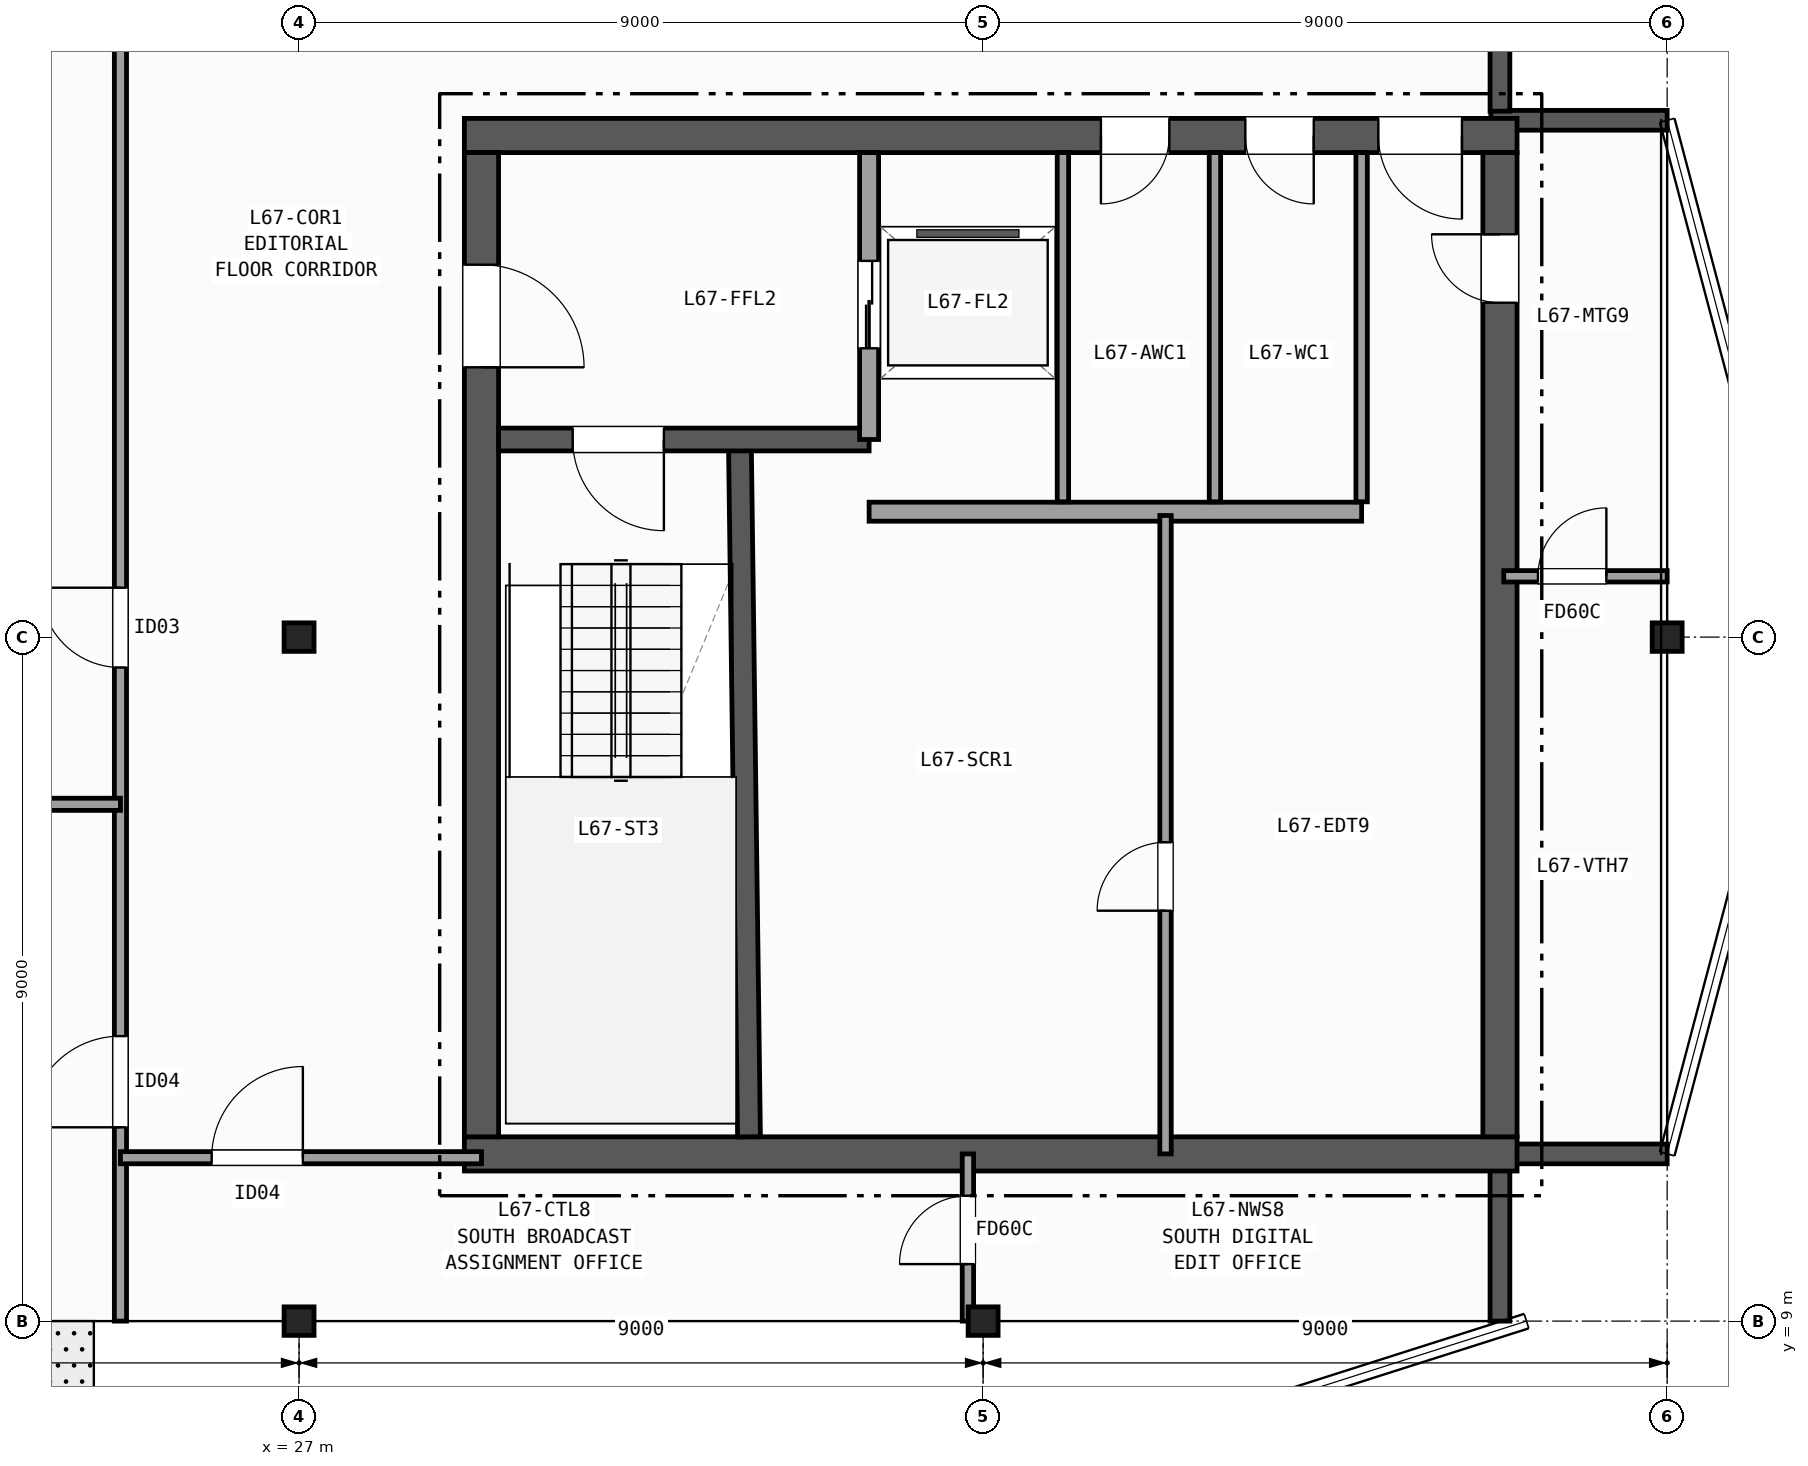
"""IFC4 building model, lengths in metres.
Left out: names, types, materials, properties, quantities, classifications, styles, units other than length and angle.
Written with IfcOpenShell. Run it as: python <this file> out.ifc"""

import sys

from ifc_helpers import new_model, si_unit, direction, frame, frame_2d, origin, origin_2d, place, context, subcontext, project, spatial, rectangle, i_section, extrude, element, fill, save


model = new_model("IFC4")
c1 = context("Model", 3, precision=1e-05, world=origin(), true_north=direction((0.0, 1.0)))
c2 = subcontext(c1, "Body", "Model", "MODEL_VIEW")
j1 = project(units=[si_unit("LENGTHUNIT", "METRE"), si_unit("PLANEANGLEUNIT", "RADIAN")], contexts=[c1])
p1 = place(None, origin())
s1 = spatial("IfcSite", under=j1, at=p1, CompositionType="ELEMENT")
p2 = place(p1, origin())
s2 = spatial("IfcBuilding", under=s1, at=p2, CompositionType="ELEMENT")
p3 = place(p2, frame((0.0, 0.0, 266.7)))
s3 = spatial("IfcBuildingStorey", under=s2, at=p3, CompositionType="ELEMENT", Elevation=266.7)
for number, where, z_axis, x_axis in (
    (1, (27.0, 9.0, 0.0), (0.0, 0.0, 1.0), (1.0, 0.0, 0.0)),
    (2, (27.0, 18.0, 0.0), (0.0, 0.0, 1.0), (1.0, 0.0, 0.0)),
    (3, (36.0, 9.0, 0.0), (0.0, 0.0, 1.0), (1.0, 0.0, 0.0)),
    (4, (45.0, 18.0, 0.0), (0.0, 0.0, 1.0), (1.0, 0.0, 0.0)),
):
    element("IfcColumn", number, at=place(p3, frame(where, z_axis=z_axis, x_axis=x_axis)), inside=s3, PredefinedType="COLUMN", context=c2, shape_type="SweptSolid", body=[
        extrude(i_section(OverallWidth=0.394, OverallDepth=0.375, WebThickness=0.017, FlangeThickness=0.028, FilletRadius=0.015, at=origin_2d()), origin(), (0.0, 0.0, 1.0), 3.7),
    ])
p4 = place(p3, frame((42.8, 9.0, 0.0), z_axis=(0.0, 0.0, 1.0), x_axis=(0.0, 1.0, 0.0)))
e5 = element("IfcWall", 5, at=p4, inside=s3, PredefinedType="SOLIDWALL", context=c2, shape_type="SweptSolid", body=[
    extrude(rectangle(XDim=2.08, YDim=0.26, at=frame_2d((1.04, 0.0))), origin(), (0.0, 0.0, 1.0), 3.42),
])
for number, where, z_axis, x_axis in (
    (6, (42.68, 11.2, 0.0), (0.0, 0.0, 1.0), (1.0, 0.0, 0.0)),
    (7, (45.0, 24.8, 0.0), (0.0, 0.0, 1.0), (-1.0, 0.0, 0.0)),
):
    element("IfcWall", number, at=place(p3, frame(where, z_axis=z_axis, x_axis=x_axis)), inside=s3, PredefinedType="SOLIDWALL", context=c2, shape_type="SweptSolid", body=[
        extrude(rectangle(XDim=2.32, YDim=0.26, at=frame_2d((1.16, 0.0))), origin(), (0.0, 0.0, 1.0), 3.42),
    ])
p5 = place(p3, frame((42.8, 24.92, 0.0), z_axis=(0.0, 0.0, 1.0), x_axis=(0.0, 1.0, 0.0)))
e8 = element("IfcWall", 8, at=p5, inside=s3, PredefinedType="SOLIDWALL", context=c2, shape_type="SweptSolid", body=[
    extrude(rectangle(XDim=2.08, YDim=0.26, at=frame_2d((1.04, 0.0))), origin(), (0.0, 0.0, 1.0), 3.42),
])
p6 = place(p3, frame((29.175, 11.2, 0.0), z_axis=(0.0, 0.0, 1.0), x_axis=(1.0, 0.0, 0.0)))
e9 = element("IfcWall", 9, at=p6, inside=s3, PredefinedType="SHEAR", context=c2, shape_type="SweptSolid", body=[
    extrude(rectangle(XDim=13.85, YDim=0.45, at=frame_2d((6.925, 0.0))), origin(), (0.0, 0.0, 1.0), 3.42),
])
p7 = place(p3, frame((43.025, 24.6, 0.0), z_axis=(0.0, 0.0, 1.0), x_axis=(-1.0, 0.0, 0.0)))
e10 = element("IfcWall", 10, at=p7, inside=s3, PredefinedType="SHEAR", context=c2, shape_type="SweptSolid", body=[
    extrude(rectangle(XDim=13.85, YDim=0.45, at=frame_2d((6.925, 0.0))), origin(), (0.0, 0.0, 1.0), 3.42),
])
p8 = place(p7, frame((0.725, 0.0, 0.0)))
e11 = element("IfcOpeningElement", 11, at=p8, cuts=e10, PredefinedType="OPENING", context=c2, shape_type="SweptSolid", body=[
    extrude(rectangle(XDim=1.1, YDim=2.15, at=frame_2d((0.55, 1.075))), frame((0.0, 0.235, 0.0), z_axis=(0.0, -1.0, 0.0), x_axis=(1.0, 0.0, 0.0)), (0.0, 0.0, 1.0), 0.47),
])
p9 = place(p7, frame((2.675, 0.0, 0.0)))
e12 = element("IfcOpeningElement", 12, at=p9, cuts=e10, PredefinedType="OPENING", context=c2, shape_type="SweptSolid", body=[
    extrude(rectangle(XDim=0.9, YDim=2.1, at=frame_2d((0.45, 1.05))), frame((0.0, 0.235, 0.0), z_axis=(0.0, -1.0, 0.0), x_axis=(1.0, 0.0, 0.0)), (0.0, 0.0, 1.0), 0.47),
])
p10 = place(p7, frame((4.575, 0.0, 0.0)))
e13 = element("IfcOpeningElement", 13, at=p10, cuts=e10, PredefinedType="OPENING", context=c2, shape_type="SweptSolid", body=[
    extrude(rectangle(XDim=0.9, YDim=2.1, at=frame_2d((0.45, 1.05))), frame((0.0, 0.235, 0.0), z_axis=(0.0, -1.0, 0.0), x_axis=(1.0, 0.0, 0.0)), (0.0, 0.0, 1.0), 0.47),
])
p11 = place(p3, frame((29.4, 24.375, 0.0), z_axis=(0.0, 0.0, 1.0), x_axis=(0.0, -1.0, 0.0)))
e14 = element("IfcWall", 14, at=p11, inside=s3, PredefinedType="SHEAR", context=c2, shape_type="SweptSolid", body=[
    extrude(rectangle(XDim=12.95, YDim=0.45, at=frame_2d((6.475, 0.0))), origin(), (0.0, 0.0, 1.0), 3.42),
])
p12 = place(p11, frame((1.475, 0.0, 0.0)))
e15 = element("IfcOpeningElement", 15, at=p12, cuts=e14, PredefinedType="OPENING", context=c2, shape_type="SweptSolid", body=[
    extrude(rectangle(XDim=1.35, YDim=2.15, at=frame_2d((0.675, 1.075))), frame((0.0, 0.235, 0.0), z_axis=(0.0, -1.0, 0.0), x_axis=(1.0, 0.0, 0.0)), (0.0, 0.0, 1.0), 0.47),
])
p13 = place(p3, frame((42.8, 11.425, 0.0), z_axis=(0.0, 0.0, 1.0), x_axis=(0.0, 1.0, 0.0)))
e16 = element("IfcWall", 16, at=p13, inside=s3, PredefinedType="SHEAR", context=c2, shape_type="SweptSolid", body=[
    extrude(rectangle(XDim=12.95, YDim=0.45, at=frame_2d((6.475, 0.0))), origin(), (0.0, 0.0, 1.0), 3.42),
])
p14 = place(p13, frame((10.975, 0.0, 0.0)))
e17 = element("IfcOpeningElement", 17, at=p14, cuts=e16, PredefinedType="OPENING", context=c2, shape_type="SweptSolid", body=[
    extrude(rectangle(XDim=0.9, YDim=2.1, at=frame_2d((0.45, 1.05))), frame((0.0, 0.235, 0.0), z_axis=(0.0, -1.0, 0.0), x_axis=(1.0, 0.0, 0.0)), (0.0, 0.0, 1.0), 0.47),
])
p15 = place(p3, frame((32.92, 11.425, 0.0), z_axis=(0.0, 0.0, 1.0), x_axis=(-0.013135638869, 0.999913723774, 0.0)))
e18 = element("IfcWall", 18, at=p15, inside=s3, PredefinedType="SHEAR", context=c2, shape_type="SweptSolid", body=[
    extrude(rectangle(XDim=9.126, YDim=0.3, at=frame_2d((4.563, 0.0))), origin(), (0.0, 0.0, 1.0), 3.42),
])
p16 = place(p3, frame((34.5, 20.6, 0.0), z_axis=(0.0, 0.0, 1.0), x_axis=(-1.0, 0.0, 0.0)))
e19 = element("IfcWall", 19, at=p16, inside=s3, PredefinedType="SHEAR", context=c2, shape_type="SweptSolid", body=[
    extrude(rectangle(XDim=4.875, YDim=0.3, at=frame_2d((2.438, 0.0))), origin(), (0.0, 0.0, 1.0), 3.42),
])
p17 = place(p16, frame((2.7, 0.0, 0.0)))
e20 = element("IfcOpeningElement", 20, at=p17, cuts=e19, PredefinedType="OPENING", context=c2, shape_type="SweptSolid", body=[
    extrude(rectangle(XDim=1.2, YDim=2.15, at=frame_2d((0.6, 1.075))), frame((0.0, 0.16, 0.0), z_axis=(0.0, -1.0, 0.0), x_axis=(1.0, 0.0, 0.0)), (0.0, 0.0, 1.0), 0.32),
])
p18 = place(p3, frame((34.5, 20.6, 0.0), z_axis=(0.0, 0.0, 1.0), x_axis=(0.0, 1.0, 0.0)))
e21 = element("IfcWall", 21, at=p18, inside=s3, PredefinedType="PARTITIONING", context=c2, shape_type="SweptSolid", body=[
    extrude(rectangle(XDim=3.775, YDim=0.25, at=frame_2d((1.887, 0.0))), origin(), (0.0, 0.0, 1.0), 3.42),
])
p19 = place(p18, frame((1.2, 0.0, 0.0)))
e22 = element("IfcOpeningElement", 22, at=p19, cuts=e21, PredefinedType="OPENING", context=c2, shape_type="SweptSolid", body=[
    extrude(rectangle(XDim=1.15, YDim=2.15, at=frame_2d((0.575, 1.075))), frame((0.0, 0.135, 0.0), z_axis=(0.0, -1.0, 0.0), x_axis=(1.0, 0.0, 0.0)), (0.0, 0.0, 1.0), 0.27),
])
p20 = place(p3, frame((34.5, 19.65, 0.0), z_axis=(0.0, 0.0, 1.0), x_axis=(1.0, 0.0, 0.0)))
e23 = element("IfcWall", 23, at=p20, inside=s3, PredefinedType="PARTITIONING", context=c2, shape_type="SweptSolid", body=[
    extrude(rectangle(XDim=6.48, YDim=0.25, at=frame_2d((3.24, 0.0))), origin(), (0.0, 0.0, 1.0), 3.42),
])
p21 = place(p3, frame((38.4, 11.2, 0.0), z_axis=(0.0, 0.0, 1.0), x_axis=(0.0, 1.0, 0.0)))
e24 = element("IfcWall", 24, at=p21, inside=s3, PredefinedType="PARTITIONING", context=c2, shape_type="SweptSolid", body=[
    extrude(rectangle(XDim=8.4, YDim=0.15, at=frame_2d((4.2, 0.0))), origin(), (0.0, 0.0, 1.0), 3.42),
])
p22 = place(p21, frame((3.2, 0.0, 0.0)))
e25 = element("IfcOpeningElement", 25, at=p22, cuts=e24, PredefinedType="OPENING", context=c2, shape_type="SweptSolid", body=[
    extrude(rectangle(XDim=0.9, YDim=2.1, at=frame_2d((0.45, 1.05))), frame((0.0, 0.085, 0.0), z_axis=(0.0, -1.0, 0.0), x_axis=(1.0, 0.0, 0.0)), (0.0, 0.0, 1.0), 0.17),
])
for number, where, z_axis, x_axis in (
    (26, (37.05, 19.78, 0.0), (0.0, 0.0, 1.0), (0.0, 1.0, 0.0)),
    (27, (39.05, 19.78, 0.0), (0.0, 0.0, 1.0), (0.0, 1.0, 0.0)),
    (28, (40.98, 19.78, 0.0), (0.0, 0.0, 1.0), (0.0, 1.0, 0.0)),
):
    element("IfcWall", number, at=place(p3, frame(where, z_axis=z_axis, x_axis=x_axis)), inside=s3, PredefinedType="PARTITIONING", context=c2, shape_type="SweptSolid", body=[
        extrude(rectangle(XDim=4.595, YDim=0.15, at=frame_2d((2.297, 0.0))), origin(), (0.0, 0.0, 1.0), 3.42),
    ])
p23 = place(p3, frame((24.65, 9.0, 0.0), z_axis=(0.0, 0.0, 1.0), x_axis=(0.0, 1.0, 0.0)))
e29 = element("IfcWall", 29, at=p23, inside=s3, PredefinedType="PARTITIONING", context=c2, shape_type="SweptSolid", body=[
    extrude(rectangle(XDim=19.2, YDim=0.16, at=frame_2d((9.6, 0.0))), origin(), (0.0, 0.0, 1.0), 2.707),
])
p24 = place(p23, frame((8.6, 0.0, 0.0)))
e30 = element("IfcOpeningElement", 30, at=p24, cuts=e29, PredefinedType="OPENING", context=c2, shape_type="SweptSolid", body=[
    extrude(rectangle(XDim=1.05, YDim=2.15, at=frame_2d((0.525, 1.075))), frame((0.0, 0.09, 0.0), z_axis=(0.0, -1.0, 0.0), x_axis=(1.0, 0.0, 0.0)), (0.0, 0.0, 1.0), 0.18),
])
p25 = place(p23, frame((2.55, 0.0, 0.0)))
e31 = element("IfcOpeningElement", 31, at=p25, cuts=e29, PredefinedType="OPENING", context=c2, shape_type="SweptSolid", body=[
    extrude(rectangle(XDim=1.2, YDim=2.15, at=frame_2d((0.6, 1.075))), frame((0.0, 0.09, 0.0), z_axis=(0.0, -1.0, 0.0), x_axis=(1.0, 0.0, 0.0)), (0.0, 0.0, 1.0), 0.18),
])
p26 = place(p3, frame((18.0, 15.8, 0.0), z_axis=(0.0, 0.0, 1.0), x_axis=(1.0, 0.0, 0.0)))
e32 = element("IfcWall", 32, at=p26, inside=s3, PredefinedType="PARTITIONING", context=c2, shape_type="SweptSolid", body=[
    extrude(rectangle(XDim=6.65, YDim=0.16, at=frame_2d((3.325, 0.0))), origin(), (0.0, 0.0, 1.0), 2.792),
])
p27 = place(p3, frame((24.65, 11.15, 0.0), z_axis=(0.0, 0.0, 1.0), x_axis=(1.0, 0.0, 0.0)))
e33 = element("IfcWall", 33, at=p27, inside=s3, PredefinedType="PARTITIONING", context=c2, shape_type="SweptSolid", body=[
    extrude(rectangle(XDim=4.75, YDim=0.16, at=frame_2d((2.375, 0.0))), origin(), (0.0, 0.0, 1.0), 2.792),
])
p28 = place(p27, frame((1.2, 0.0, 0.0)))
e34 = element("IfcOpeningElement", 34, at=p28, cuts=e33, PredefinedType="OPENING", context=c2, shape_type="SweptSolid", body=[
    extrude(rectangle(XDim=1.2, YDim=2.15, at=frame_2d((0.6, 1.075))), frame((0.0, 0.09, 0.0), z_axis=(0.0, -1.0, 0.0), x_axis=(1.0, 0.0, 0.0)), (0.0, 0.0, 1.0), 0.18),
])
p29 = place(p3, frame((35.8, 9.0, 0.0), z_axis=(0.0, 0.0, 1.0), x_axis=(0.0, 1.0, 0.0)))
e35 = element("IfcWall", 35, at=p29, inside=s3, PredefinedType="PARTITIONING", context=c2, shape_type="SweptSolid", body=[
    extrude(rectangle(XDim=2.2, YDim=0.15, at=frame_2d((1.1, 0.0))), origin(), (0.0, 0.0, 1.0), 2.707),
])
p30 = place(p29, frame((0.75, 0.0, 0.0)))
e36 = element("IfcOpeningElement", 36, at=p30, cuts=e35, PredefinedType="OPENING", context=c2, shape_type="SweptSolid", body=[
    extrude(rectangle(XDim=0.9, YDim=2.1, at=frame_2d((0.45, 1.05))), frame((0.0, 0.085, 0.0), z_axis=(0.0, -1.0, 0.0), x_axis=(1.0, 0.0, 0.0)), (0.0, 0.0, 1.0), 0.17),
])
p31 = place(p3, frame((42.85, 18.8, 0.0), z_axis=(0.0, 0.0, 1.0), x_axis=(1.0, 0.0, 0.0)))
e37 = element("IfcWall", 37, at=p31, inside=s3, PredefinedType="PARTITIONING", context=c2, shape_type="SweptSolid", body=[
    extrude(rectangle(XDim=2.15, YDim=0.15, at=frame_2d((1.075, 0.0))), origin(), (0.0, 0.0, 1.0), 3.42),
])
p32 = place(p31, frame((0.45, 0.0, 0.0)))
e38 = element("IfcOpeningElement", 38, at=p32, cuts=e37, PredefinedType="OPENING", context=c2, shape_type="SweptSolid", body=[
    extrude(rectangle(XDim=0.9, YDim=2.1, at=frame_2d((0.45, 1.05))), frame((0.0, 0.085, 0.0), z_axis=(0.0, -1.0, 0.0), x_axis=(1.0, 0.0, 0.0)), (0.0, 0.0, 1.0), 0.17),
])
p33 = place(p17, origin())
e39 = element("IfcDoor", 39, at=p33, inside=s3, OperationType="SINGLE_SWING_LEFT", PredefinedType="DOOR", context=c2, shape_type="SweptSolid", body=[
    extrude(rectangle(XDim=1.2, YDim=2.15, at=frame_2d((0.6, 1.075))), frame((0.0, 0.025, 0.0), z_axis=(0.0, -1.0, 0.0), x_axis=(1.0, 0.0, 0.0)), (0.0, 0.0, 1.0), 0.05),
])
fill(e20, e39)
p34 = place(p12, origin())
e40 = element("IfcDoor", 40, at=p34, inside=s3, OperationType="SINGLE_SWING_RIGHT", PredefinedType="DOOR", context=c2, shape_type="SweptSolid", body=[
    extrude(rectangle(XDim=1.35, YDim=2.15, at=frame_2d((0.675, 1.075))), frame((0.0, 0.025, 0.0), z_axis=(0.0, -1.0, 0.0), x_axis=(1.0, 0.0, 0.0)), (0.0, 0.0, 1.0), 0.05),
])
fill(e15, e40)
p35 = place(p14, origin())
e41 = element("IfcDoor", 41, at=p35, inside=s3, OperationType="SINGLE_SWING_RIGHT", PredefinedType="DOOR", context=c2, shape_type="SweptSolid", body=[
    extrude(rectangle(XDim=0.9, YDim=2.1, at=frame_2d((0.45, 1.05))), frame((0.0, 0.025, 0.0), z_axis=(0.0, -1.0, 0.0), x_axis=(1.0, 0.0, 0.0)), (0.0, 0.0, 1.0), 0.05),
])
fill(e17, e41)
p36 = place(p8, origin())
e42 = element("IfcDoor", 42, at=p36, inside=s3, OperationType="SINGLE_SWING_LEFT", PredefinedType="DOOR", context=c2, shape_type="SweptSolid", body=[
    extrude(rectangle(XDim=1.1, YDim=2.15, at=frame_2d((0.55, 1.075))), frame((0.0, 0.025, 0.0), z_axis=(0.0, -1.0, 0.0), x_axis=(1.0, 0.0, 0.0)), (0.0, 0.0, 1.0), 0.05),
])
fill(e11, e42)
p37 = place(p9, origin())
e43 = element("IfcDoor", 43, at=p37, inside=s3, OperationType="SINGLE_SWING_LEFT", PredefinedType="DOOR", context=c2, shape_type="SweptSolid", body=[
    extrude(rectangle(XDim=0.9, YDim=2.1, at=frame_2d((0.45, 1.05))), frame((0.0, 0.025, 0.0), z_axis=(0.0, -1.0, 0.0), x_axis=(1.0, 0.0, 0.0)), (0.0, 0.0, 1.0), 0.05),
])
fill(e12, e43)
p38 = place(p10, origin())
e44 = element("IfcDoor", 44, at=p38, inside=s3, OperationType="SINGLE_SWING_RIGHT", PredefinedType="DOOR", context=c2, shape_type="SweptSolid", body=[
    extrude(rectangle(XDim=0.9, YDim=2.1, at=frame_2d((0.45, 1.05))), frame((0.0, 0.025, 0.0), z_axis=(0.0, -1.0, 0.0), x_axis=(1.0, 0.0, 0.0)), (0.0, 0.0, 1.0), 0.05),
])
fill(e13, e44)
p39 = place(p19, origin())
e45 = element("IfcDoor", 45, at=p39, inside=s3, OperationType="DOUBLE_DOOR_SLIDING", PredefinedType="DOOR", context=c2, shape_type="SweptSolid", body=[
    extrude(rectangle(XDim=1.15, YDim=2.15, at=frame_2d((0.575, 1.075))), frame((0.0, 0.025, 0.0), z_axis=(0.0, -1.0, 0.0), x_axis=(1.0, 0.0, 0.0)), (0.0, 0.0, 1.0), 0.05),
])
fill(e22, e45)
p40 = place(p22, origin())
e46 = element("IfcDoor", 46, at=p40, inside=s3, OperationType="SINGLE_SWING_LEFT", PredefinedType="DOOR", context=c2, shape_type="SweptSolid", body=[
    extrude(rectangle(XDim=0.9, YDim=2.1, at=frame_2d((0.45, 1.05))), frame((0.0, 0.025, 0.0), z_axis=(0.0, -1.0, 0.0), x_axis=(1.0, 0.0, 0.0)), (0.0, 0.0, 1.0), 0.05),
])
fill(e25, e46)
p41 = place(p24, origin())
e47 = element("IfcDoor", 47, at=p41, inside=s3, OperationType="SINGLE_SWING_RIGHT", PredefinedType="DOOR", context=c2, shape_type="SweptSolid", body=[
    extrude(rectangle(XDim=1.05, YDim=2.15, at=frame_2d((0.525, 1.075))), frame((0.0, 0.025, 0.0), z_axis=(0.0, -1.0, 0.0), x_axis=(1.0, 0.0, 0.0)), (0.0, 0.0, 1.0), 0.05),
])
fill(e30, e47)
p42 = place(p25, origin())
e48 = element("IfcDoor", 48, at=p42, inside=s3, OperationType="SINGLE_SWING_LEFT", PredefinedType="DOOR", context=c2, shape_type="SweptSolid", body=[
    extrude(rectangle(XDim=1.2, YDim=2.15, at=frame_2d((0.6, 1.075))), frame((0.0, 0.025, 0.0), z_axis=(0.0, -1.0, 0.0), x_axis=(1.0, 0.0, 0.0)), (0.0, 0.0, 1.0), 0.05),
])
fill(e31, e48)
p43 = place(p28, origin())
e49 = element("IfcDoor", 49, at=p43, inside=s3, OperationType="SINGLE_SWING_RIGHT", PredefinedType="DOOR", context=c2, shape_type="SweptSolid", body=[
    extrude(rectangle(XDim=1.2, YDim=2.15, at=frame_2d((0.6, 1.075))), frame((0.0, 0.025, 0.0), z_axis=(0.0, -1.0, 0.0), x_axis=(1.0, 0.0, 0.0)), (0.0, 0.0, 1.0), 0.05),
])
fill(e34, e49)
p44 = place(p30, origin())
e50 = element("IfcDoor", 50, at=p44, inside=s3, OperationType="SINGLE_SWING_LEFT", PredefinedType="DOOR", context=c2, shape_type="SweptSolid", body=[
    extrude(rectangle(XDim=0.9, YDim=2.1, at=frame_2d((0.45, 1.05))), frame((0.0, 0.025, 0.0), z_axis=(0.0, -1.0, 0.0), x_axis=(1.0, 0.0, 0.0)), (0.0, 0.0, 1.0), 0.05),
])
fill(e36, e50)
p45 = place(p32, origin())
e51 = element("IfcDoor", 51, at=p45, inside=s3, OperationType="SINGLE_SWING_RIGHT", PredefinedType="DOOR", context=c2, shape_type="SweptSolid", body=[
    extrude(rectangle(XDim=0.9, YDim=2.1, at=frame_2d((0.45, 1.05))), frame((0.0, 0.025, 0.0), z_axis=(0.0, -1.0, 0.0), x_axis=(1.0, 0.0, 0.0)), (0.0, 0.0, 1.0), 0.05),
])
fill(e38, e51)
save(model, sys.argv[1])
